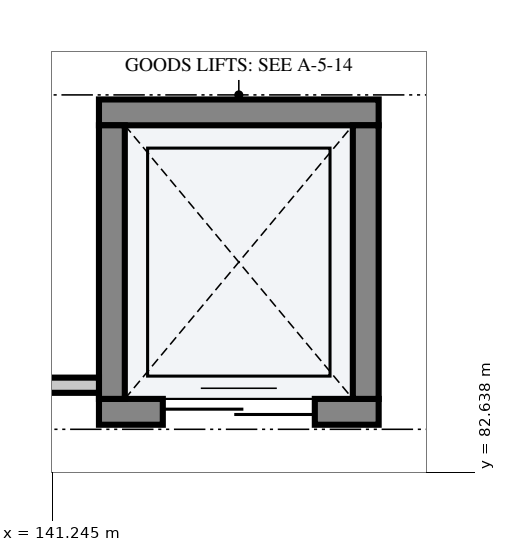
"""IFC4 building model, lengths in metres.
Left out: names, types, materials, properties, quantities, classifications, styles, units other than length and angle.
Written with IfcOpenShell. Run it as: python <this file> out.ifc"""

import sys

from ifc_helpers import new_model, si_unit, direction, frame, frame_2d, origin, place, context, subcontext, project, spatial, rectangle, extrude, element, fill, save


model = new_model("IFC4")
c1 = context("Model", 3, precision=1e-05, world=origin(), true_north=direction((0.0, 1.0)))
c2 = subcontext(c1, "Body", "Model", "MODEL_VIEW")
j1 = project(units=[si_unit("LENGTHUNIT", "METRE"), si_unit("PLANEANGLEUNIT", "RADIAN")], contexts=[c1])
p1 = place(None, origin())
s1 = spatial("IfcSite", under=j1, at=p1, CompositionType="ELEMENT")
p2 = place(p1, origin())
s2 = spatial("IfcBuilding", under=s1, at=p2, CompositionType="ELEMENT")
p3 = place(p2, frame((0.0, 0.0, 15.0)))
s3 = spatial("IfcBuildingStorey", under=s2, at=p3, CompositionType="ELEMENT", Elevation=15.0)
p4 = place(p3, frame((141.86, 83.43, 0.0), z_axis=(0.0, 0.0, 1.0), x_axis=(1.0, 0.0, 0.0)))
e1 = element("IfcWall", 1, at=p4, inside=s3, PredefinedType="SHEAR", context=c2, shape_type="SweptSolid", body=[
    extrude(rectangle(XDim=3.68, YDim=0.34, at=frame_2d((1.84, 0.0))), origin(), (0.0, 0.0, 1.0), 4.52),
])
p5 = place(p4, frame((0.84, 0.0, 0.0)))
e2 = element("IfcOpeningElement", 2, at=p5, cuts=e1, PredefinedType="OPENING", context=c2, shape_type="SweptSolid", body=[
    extrude(rectangle(XDim=2.0, YDim=2.4, at=frame_2d((1.0, 1.2))), frame((0.0, 0.182, 0.0), z_axis=(0.0, -1.0, 0.0), x_axis=(1.0, 0.0, 0.0)), (0.0, 0.0, 1.0), 0.364),
])
p6 = place(p3, frame((141.86, 87.37, 0.0), z_axis=(0.0, 0.0, 1.0), x_axis=(1.0, 0.0, 0.0)))
e3 = element("IfcWall", 3, at=p6, inside=s3, PredefinedType="SHEAR", context=c2, shape_type="SweptSolid", body=[
    extrude(rectangle(XDim=3.68, YDim=0.34, at=frame_2d((1.84, 0.0))), origin(), (0.0, 0.0, 1.0), 4.52),
])
for number, where, z_axis, x_axis in (
    (4, (142.03, 83.6, 0.0), (0.0, 0.0, 1.0), (0.0, 1.0, 0.0)),
    (5, (145.37, 83.6, 0.0), (0.0, 0.0, 1.0), (0.0, 1.0, 0.0)),
):
    element("IfcWall", number, at=place(p3, frame(where, z_axis=z_axis, x_axis=x_axis)), inside=s3, PredefinedType="SHEAR", context=c2, shape_type="SweptSolid", body=[
        extrude(rectangle(XDim=3.6, YDim=0.34, at=frame_2d((1.8, 0.0))), origin(), (0.0, 0.0, 1.0), 4.52),
    ])
p7 = place(p3, frame((141.86, 83.78, 0.0), z_axis=(0.0, 0.0, 1.0), x_axis=(-1.0, 0.0, 0.0)))
e6 = element("IfcWall", 6, at=p7, inside=s3, PredefinedType="PARTITIONING", context=c2, shape_type="SweptSolid", body=[
    extrude(rectangle(XDim=5.32, YDim=0.2, at=frame_2d((2.66, 0.0))), origin(), (0.0, 0.0, 1.0), 3.46),
])
p8 = place(p5, origin())
e7 = element("IfcDoor", 7, at=p8, inside=s3, OperationType="DOUBLE_DOOR_SLIDING", PredefinedType="DOOR", context=c2, shape_type="SweptSolid", body=[
    extrude(rectangle(XDim=2.0, YDim=2.4, at=frame_2d((1.0, 1.2))), frame((0.0, 0.025, 0.0), z_axis=(0.0, -1.0, 0.0), x_axis=(1.0, 0.0, 0.0)), (0.0, 0.0, 1.0), 0.05),
])
fill(e2, e7)
save(model, sys.argv[1])
